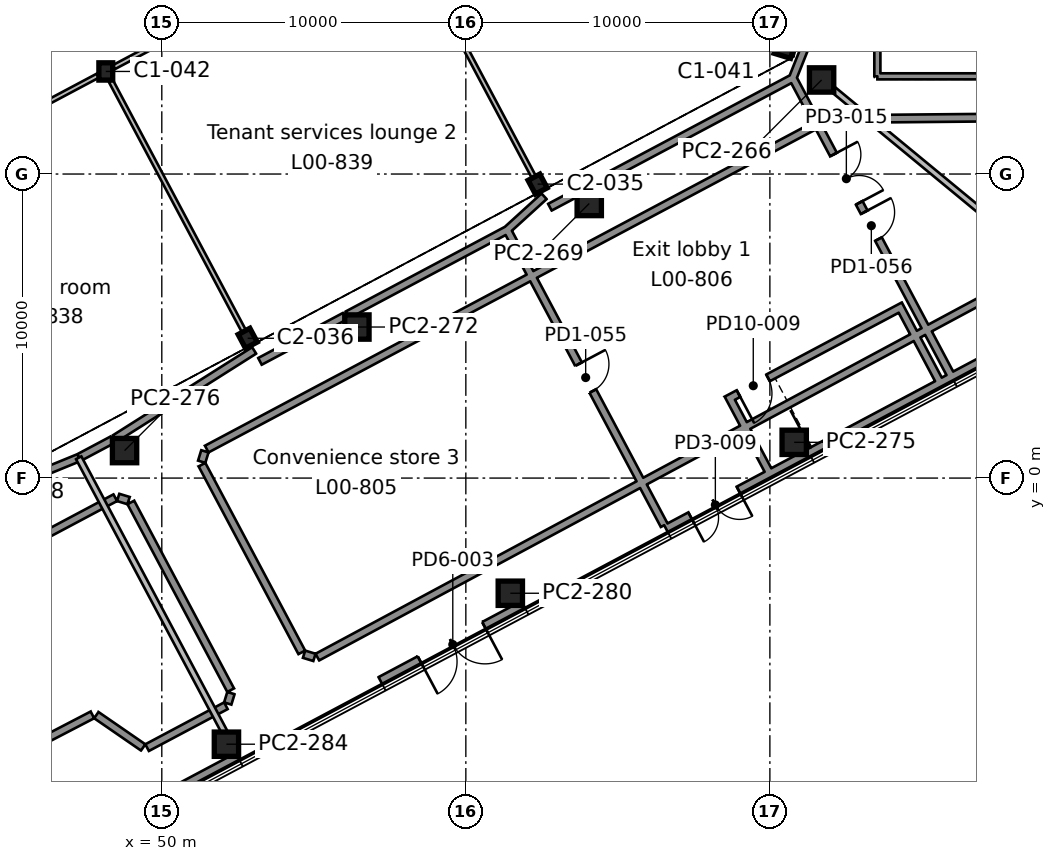
"""IFC4 building model, lengths in metres.
Left out: names, types, materials, properties, quantities, classifications, styles, units other than length and angle.
Written with IfcOpenShell. Run it as: python <this file> out.ifc"""

import sys

from ifc_helpers import new_model, si_unit, direction, frame, frame_2d, origin, origin_2d, place, context, subcontext, project, spatial, rectangle, i_section, extrude, element, fill, save


model = new_model("IFC4")
c1 = context("Model", 3, precision=1e-05, world=origin(), true_north=direction((0.0, 1.0)))
c2 = subcontext(c1, "Body", "Model", "MODEL_VIEW")
j1 = project(units=[si_unit("LENGTHUNIT", "METRE"), si_unit("PLANEANGLEUNIT", "RADIAN")], contexts=[c1])
p1 = place(None, origin())
s1 = spatial("IfcSite", under=j1, at=p1, CompositionType="ELEMENT")
p2 = place(p1, origin())
s2 = spatial("IfcBuilding", under=s1, at=p2, CompositionType="ELEMENT")
p3 = place(p2, origin())
s3 = spatial("IfcBuildingStorey", under=s2, at=p3, CompositionType="ELEMENT", Elevation=0.0)
for number, where, z_axis, x_axis in (
    (1, (52.825, 4.598, 0.0), (0.0, 0.0, 1.0), (0.883, 0.469, 0.0)),
    (2, (62.361, 9.668, 0.0), (0.0, 0.0, 1.0), (0.883, 0.469, 0.0)),
):
    element("IfcColumn", number, at=place(p3, frame(where, z_axis=z_axis, x_axis=x_axis)), inside=s3, PredefinedType="COLUMN", context=c2, shape_type="SweptSolid", body=[
        extrude(i_section(OverallWidth=0.437, OverallDepth=0.513, WebThickness=0.061, FlangeThickness=0.097, FilletRadius=0.015, at=origin_2d()), origin(), (0.0, 0.0, 1.0), 7.0),
    ])
for number, where, z_axis, x_axis in (
    (3, (48.158, 13.374, 0.0), (0.0, 0.0, 1.0), (1.0, 0.0, 0.0)),
    (4, (70.474, 14.106, 0.0), (0.0, 0.0, 1.0), (0.292, 0.956, 0.0)),
):
    element("IfcColumn", number, at=place(p3, frame(where, z_axis=z_axis, x_axis=x_axis)), inside=s3, PredefinedType="COLUMN", context=c2, shape_type="SweptSolid", body=[
        extrude(i_section(OverallWidth=0.455, OverallDepth=0.569, WebThickness=0.078, FlangeThickness=0.125, FilletRadius=0.015, at=origin_2d()), origin(), (0.0, 0.0, 1.0), 7.0),
    ])
for number, where, z_axis, x_axis in (
    (5, (52.126, -8.753, 0.0), (0.0, 0.0, 1.0), (1.0, 0.0, 0.0)),
    (6, (61.463, -3.788, 0.0), (0.0, 0.0, 1.0), (1.0, 0.0, 0.0)),
    (7, (48.775, 0.904, 0.0), (0.0, 0.0, 1.0), (1.0, 0.0, 0.0)),
    (8, (70.8, 1.176, 0.0), (0.0, 0.0, 1.0), (1.0, 0.0, 0.0)),
    (9, (56.417, 4.968, 0.0), (0.0, 0.0, 1.0), (1.0, 0.0, 0.0)),
    (10, (64.059, 9.031, 0.0), (0.0, 0.0, 1.0), (1.0, 0.0, 0.0)),
    (11, (71.701, 13.094, 0.0), (0.0, 0.0, 1.0), (1.0, 0.0, 0.0)),
):
    element("IfcColumn", number, at=place(p3, frame(where, z_axis=z_axis, x_axis=x_axis)), inside=s3, PredefinedType="COLUMN", context=c2, shape_type="SweptSolid", body=[
        extrude(rectangle(XDim=0.8, YDim=0.8, at=origin_2d()), origin(), (0.0, 0.0, 1.0), 6.37),
    ])
p4 = place(p3, frame((29.035, -21.71, 0.0), z_axis=(0.0, 0.0, 1.0), x_axis=(0.882950500829, 0.469466093648, 0.0)))
e12 = element("IfcWall", 12, at=p4, inside=s3, PredefinedType="SOLIDWALL", context=c2, shape_type="SweptSolid", body=[
    extrude(rectangle(XDim=26.603, YDim=0.4, at=frame_2d((13.301, 0.0))), origin(), (0.0, 0.0, 1.0), 6.37),
])
p5 = place(p4, frame((1.46, 0.0, 0.0)))
e13 = element("IfcOpeningElement", 13, at=p5, cuts=e12, PredefinedType="OPENING", context=c2, shape_type="SweptSolid", body=[
    extrude(rectangle(XDim=2.4, YDim=2.4, at=frame_2d((1.2, 1.2))), frame((0.0, 0.21, 0.0), z_axis=(0.0, -1.0, 0.0), x_axis=(1.0, 0.0, 0.0)), (0.0, 0.0, 1.0), 0.42),
])
p6 = place(p3, frame((57.222, -6.723, 0.0), z_axis=(0.0, 0.0, 1.0), x_axis=(0.882960613555, 0.4694470736, 0.0)))
e14 = element("IfcWall", 14, at=p6, inside=s3, PredefinedType="SOLIDWALL", context=c2, shape_type="SweptSolid", body=[
    extrude(rectangle(XDim=5.321, YDim=0.4, at=frame_2d((2.66, 0.0))), origin(), (0.0, 0.0, 1.0), 6.37),
])
p7 = place(p6, frame((1.46, 0.0, 0.0)))
e15 = element("IfcOpeningElement", 15, at=p7, cuts=e14, PredefinedType="OPENING", context=c2, shape_type="SweptSolid", body=[
    extrude(rectangle(XDim=2.4, YDim=2.4, at=frame_2d((1.2, 1.2))), frame((0.0, 0.21, 0.0), z_axis=(0.0, -1.0, 0.0), x_axis=(1.0, 0.0, 0.0)), (0.0, 0.0, 1.0), 0.42),
])
p8 = place(p3, frame((66.617, -1.727, 0.0), z_axis=(0.0, 0.0, 1.0), x_axis=(0.882952470549, 0.469462389071, 0.0)))
e16 = element("IfcWall", 16, at=p8, inside=s3, PredefinedType="SOLIDWALL", context=c2, shape_type="SweptSolid", body=[
    extrude(rectangle(XDim=15.999, YDim=0.4, at=frame_2d((8.0, 0.0))), origin(), (0.0, 0.0, 1.0), 6.37),
])
p9 = place(p8, frame((0.9, 0.0, 0.0)))
e17 = element("IfcOpeningElement", 17, at=p9, cuts=e16, PredefinedType="OPENING", context=c2, shape_type="SweptSolid", body=[
    extrude(rectangle(XDim=1.8, YDim=2.1, at=frame_2d((0.9, 1.05))), frame((0.0, 0.21, 0.0), z_axis=(0.0, -1.0, 0.0), x_axis=(1.0, 0.0, 0.0)), (0.0, 0.0, 1.0), 0.42),
])
p10 = place(p8, frame((12.101, 0.0, 0.0)))
e18 = element("IfcOpeningElement", 18, at=p10, cuts=e16, PredefinedType="OPENING", context=c2, shape_type="SweptSolid", body=[
    extrude(rectangle(XDim=2.4, YDim=2.4, at=frame_2d((1.2, 1.2))), frame((0.0, 0.21, 0.0), z_axis=(0.0, -1.0, 0.0), x_axis=(1.0, 0.0, 0.0)), (0.0, 0.0, 1.0), 0.42),
])
p11 = place(p3, frame((33.134, -8.8, 7.0), z_axis=(0.0, 0.0, 1.0), x_axis=(0.882946405611, 0.469473795667, 0.0)))
e19 = element("IfcWall", 19, at=p11, inside=s3, PredefinedType="STANDARD", context=c2, shape_type="SweptSolid", body=[
    extrude(rectangle(XDim=17.368, YDim=0.25, at=frame_2d((8.684, 0.0))), origin(), (0.0, 0.0, 1.0), 0.65),
])
p12 = place(p3, frame((48.565, -0.636, 7.0), z_axis=(0.0, 0.0, 1.0), x_axis=(0.956161046089, -0.292841346024, 0.0)))
e20 = element("IfcWall", 20, at=p12, inside=s3, PredefinedType="STANDARD", context=c2, shape_type="SweptSolid", body=[
    extrude(rectangle(XDim=0.358, YDim=0.25, at=frame_2d((0.179, 0.0))), origin(), (0.0, 0.0, 1.0), 0.65),
])
p13 = place(p3, frame((48.982, -0.802, 7.0), z_axis=(0.0, 0.0, 1.0), x_axis=(0.469473426487, -0.882946601909, 0.0)))
e21 = element("IfcWall", 21, at=p13, inside=s3, PredefinedType="STANDARD", context=c2, shape_type="SweptSolid", body=[
    extrude(rectangle(XDim=6.993, YDim=0.25, at=frame_2d((3.497, 0.0))), origin(), (0.0, 0.0, 1.0), 0.65),
])
p14 = place(p3, frame((52.274, -7.072, 7.0), z_axis=(0.0, 0.0, 1.0), x_axis=(-0.2920282937, -0.956409679833, 0.0)))
e22 = element("IfcWall", 22, at=p14, inside=s3, PredefinedType="STANDARD", context=c2, shape_type="SweptSolid", body=[
    extrude(rectangle(XDim=0.359, YDim=0.25, at=frame_2d((0.179, 0.0))), origin(), (0.0, 0.0, 1.0), 0.65),
])
p15 = place(p3, frame((52.108, -7.488, 7.0), z_axis=(0.0, 0.0, 1.0), x_axis=(-0.882932555062, -0.469499843675, 0.0)))
e23 = element("IfcWall", 23, at=p15, inside=s3, PredefinedType="STANDARD", context=c2, shape_type="SweptSolid", body=[
    extrude(rectangle(XDim=2.935, YDim=0.25, at=frame_2d((1.467, 0.0))), origin(), (0.0, 0.0, 1.0), 0.65),
])
p16 = place(p3, frame((49.387, -8.859, 7.0), z_axis=(0.0, 0.0, 1.0), x_axis=(-0.823317911424, 0.567580493612, 0.0)))
e24 = element("IfcWall", 24, at=p16, inside=s3, PredefinedType="STANDARD", context=c2, shape_type="SweptSolid", body=[
    extrude(rectangle(XDim=1.871, YDim=0.25, at=frame_2d((0.936, 0.0))), origin(), (0.0, 0.0, 1.0), 0.65),
])
p17 = place(p3, frame((47.718, -7.789, 7.0), z_axis=(0.0, 0.0, 1.0), x_axis=(-0.887347881886, -0.461100570931, 0.0)))
e25 = element("IfcWall", 25, at=p17, inside=s3, PredefinedType="STANDARD", context=c2, shape_type="SweptSolid", body=[
    extrude(rectangle(XDim=9.695, YDim=0.25, at=frame_2d((4.847, 0.0))), origin(), (0.0, 0.0, 1.0), 0.65),
])
p18 = place(p3, frame((71.913, 11.806, 7.0), z_axis=(0.0, 0.0, 1.0), x_axis=(0.999958126226, 0.0091512728, 0.0)))
e26 = element("IfcWall", 26, at=p18, inside=s3, PredefinedType="STANDARD", context=c2, shape_type="SweptSolid", body=[
    extrude(rectangle(XDim=6.723, YDim=0.25, at=frame_2d((3.361, 0.0))), origin(), (0.0, 0.0, 1.0), 0.65),
])
p19 = place(p3, frame((79.199, 7.048, 7.0), z_axis=(0.0, 0.0, 1.0), x_axis=(-0.880943825578, -0.473220853488, 0.0)))
e27 = element("IfcWall", 27, at=p19, inside=s3, PredefinedType="STANDARD", context=c2, shape_type="SweptSolid", body=[
    extrude(rectangle(XDim=27.337, YDim=0.25, at=frame_2d((13.668, 0.0))), origin(), (0.0, 0.0, 1.0), 0.65),
])
p20 = place(p3, frame((55.021, -5.898, 7.0), z_axis=(0.0, 0.0, 1.0), x_axis=(-0.956425680527, 0.291975885354, 0.0)))
e28 = element("IfcWall", 28, at=p20, inside=s3, PredefinedType="STANDARD", context=c2, shape_type="SweptSolid", body=[
    extrude(rectangle(XDim=0.358, YDim=0.25, at=frame_2d((0.179, 0.0))), origin(), (0.0, 0.0, 1.0), 0.65),
])
p21 = place(p3, frame((54.604, -5.732, 7.0), z_axis=(0.0, 0.0, 1.0), x_axis=(-0.46950064371, 0.882932129643, 0.0)))
e29 = element("IfcWall", 29, at=p21, inside=s3, PredefinedType="STANDARD", context=c2, shape_type="SweptSolid", body=[
    extrude(rectangle(XDim=6.993, YDim=0.25, at=frame_2d((3.497, 0.0))), origin(), (0.0, 0.0, 1.0), 0.65),
])
p22 = place(p3, frame((51.312, 0.537, 7.0), z_axis=(0.0, 0.0, 1.0), x_axis=(0.2920282937, 0.956409679833, 0.0)))
e30 = element("IfcWall", 30, at=p22, inside=s3, PredefinedType="STANDARD", context=c2, shape_type="SweptSolid", body=[
    extrude(rectangle(XDim=0.359, YDim=0.25, at=frame_2d((0.179, 0.0))), origin(), (0.0, 0.0, 1.0), 0.65),
])
p23 = place(p3, frame((51.478, 0.954, 7.0), z_axis=(0.0, 0.0, 1.0), x_axis=(0.88290924417, 0.469543679075, 0.0)))
e31 = element("IfcWall", 31, at=p23, inside=s3, PredefinedType="STANDARD", context=c2, shape_type="SweptSolid", body=[
    extrude(rectangle(XDim=23.081, YDim=0.25, at=frame_2d((11.541, 0.0))), origin(), (0.0, 0.0, 1.0), 0.65),
])
for number, where, z_axis, x_axis in (
    (32, (77.335, 13.213, 6.92), (0.0, 0.0, 1.0), (-1.0, 0.0, 0.0)),
    (33, (73.535, 13.213, 6.92), (0.0, 0.0, 1.0), (0.0, 1.0, 0.0)),
):
    element("IfcWall", number, at=place(p3, frame(where, z_axis=z_axis, x_axis=x_axis)), inside=s3, PredefinedType="SOLIDWALL", context=c2, shape_type="SweptSolid", body=[
        extrude(rectangle(XDim=3.8, YDim=0.2, at=frame_2d((1.9, 0.0))), origin(), (0.0, 0.0, 1.0), 0.18),
    ])
p24 = place(p3, frame((52.063, -8.353, 0.0), z_axis=(0.0, 0.0, 1.0), x_axis=(-0.469467926311, 0.882949526397, 0.0)))
e34 = element("IfcWall", 34, at=p24, inside=s3, PredefinedType="PARTITIONING", context=c2, shape_type="SweptSolid", body=[
    extrude(rectangle(XDim=10.217, YDim=0.2, at=frame_2d((5.109, 0.0))), origin(), (0.0, 0.0, 1.0), 6.37),
])
p25 = place(p3, frame((47.27, 0.67, 0.0), z_axis=(0.0, 0.0, 1.0), x_axis=(-0.925490593681, -0.378770591531, 0.0)))
e35 = element("IfcWall", 35, at=p25, inside=s3, PredefinedType="SOLIDWALL", context=c2, shape_type="SweptSolid", body=[
    extrude(rectangle(XDim=4.072, YDim=0.25, at=frame_2d((2.036, 0.0))), origin(), (0.0, 0.0, 1.0), 6.37),
])
p26 = place(p3, frame((66.523, -1.551, 0.0), z_axis=(0.0, 0.0, 1.0), x_axis=(-0.469471626463, 0.882947559001, 0.0)))
e36 = element("IfcWall", 36, at=p26, inside=s3, PredefinedType="SOLIDWALL", context=c2, shape_type="SweptSolid", body=[
    extrude(rectangle(XDim=11.0, YDim=0.25, at=frame_2d((5.5, 0.0))), origin(), (0.0, 0.0, 1.0), 6.37),
])
p27 = place(p26, frame((5.0, 0.0, 0.0)))
e37 = element("IfcOpeningElement", 37, at=p27, cuts=e36, PredefinedType="OPENING", context=c2, shape_type="SweptSolid", body=[
    extrude(rectangle(XDim=1.0, YDim=2.1, at=frame_2d((0.5, 1.05))), frame((0.0, 0.135, 0.0), z_axis=(0.0, -1.0, 0.0), x_axis=(1.0, 0.0, 0.0)), (0.0, 0.0, 1.0), 0.27),
])
p28 = place(p3, frame((53.037, 4.198, 0.0), z_axis=(0.0, 0.0, 1.0), x_axis=(-0.845143693755, -0.534539181825, 0.0)))
e38 = element("IfcWall", 38, at=p28, inside=s3, PredefinedType="SOLIDWALL", context=c2, shape_type="SweptSolid", body=[
    extrude(rectangle(XDim=5.414, YDim=0.25, at=frame_2d((2.707, 0.0))), origin(), (0.0, 0.0, 1.0), 6.37),
])
p29 = place(p3, frame((48.375, 1.258, 0.0), z_axis=(0.0, 0.0, 1.0), x_axis=(-0.883006084416, -0.469361539631, 0.0)))
e39 = element("IfcWall", 39, at=p29, inside=s3, PredefinedType="SOLIDWALL", context=c2, shape_type="SweptSolid", body=[
    extrude(rectangle(XDim=1.24, YDim=0.25, at=frame_2d((0.62, 0.0))), origin(), (0.0, 0.0, 1.0), 6.37),
])
p30 = place(p3, frame((61.363, 8.164, 0.0), z_axis=(0.0, 0.0, 1.0), x_axis=(-0.882945796858, -0.469474940556, 0.0)))
e40 = element("IfcWall", 40, at=p30, inside=s3, PredefinedType="SOLIDWALL", context=c2, shape_type="SweptSolid", body=[
    extrude(rectangle(XDim=5.955, YDim=0.25, at=frame_2d((2.978, 0.0))), origin(), (0.0, 0.0, 1.0), 6.37),
])
p31 = place(p3, frame((56.017, 5.321, 0.0), z_axis=(0.0, 0.0, 1.0), x_axis=(-0.882921481106, -0.469520668555, 0.0)))
e41 = element("IfcWall", 41, at=p31, inside=s3, PredefinedType="SOLIDWALL", context=c2, shape_type="SweptSolid", body=[
    extrude(rectangle(XDim=3.158, YDim=0.25, at=frame_2d((1.579, 0.0))), origin(), (0.0, 0.0, 1.0), 6.37),
])
p32 = place(p3, frame((75.919, 3.445, 0.0), z_axis=(0.0, 0.0, 1.0), x_axis=(-0.469463523634, 0.882951867305, 0.0)))
e42 = element("IfcWall", 42, at=p32, inside=s3, PredefinedType="SOLIDWALL", context=c2, shape_type="SweptSolid", body=[
    extrude(rectangle(XDim=11.0, YDim=0.25, at=frame_2d((5.5, 0.0))), origin(), (0.0, 0.0, 1.0), 6.37),
])
p33 = place(p32, frame((5.0, 0.0, 0.0)))
e43 = element("IfcOpeningElement", 43, at=p33, cuts=e42, PredefinedType="OPENING", context=c2, shape_type="SweptSolid", body=[
    extrude(rectangle(XDim=1.0, YDim=2.1, at=frame_2d((0.5, 1.05))), frame((0.0, 0.135, 0.0), z_axis=(0.0, -1.0, 0.0), x_axis=(1.0, 0.0, 0.0)), (0.0, 0.0, 1.0), 0.27),
])
p34 = place(p32, frame((6.35, 0.0, 0.0)))
e44 = element("IfcOpeningElement", 44, at=p34, cuts=e42, PredefinedType="OPENING", context=c2, shape_type="SweptSolid", body=[
    extrude(rectangle(XDim=1.8, YDim=2.1, at=frame_2d((0.9, 1.05))), frame((0.0, 0.135, 0.0), z_axis=(0.0, -1.0, 0.0), x_axis=(1.0, 0.0, 0.0)), (0.0, 0.0, 1.0), 0.27),
])
p35 = place(p3, frame((62.573, 9.268, 0.0), z_axis=(0.0, 0.0, 1.0), x_axis=(-0.739544046234, -0.673108166404, 0.0)))
e45 = element("IfcWall", 45, at=p35, inside=s3, PredefinedType="SOLIDWALL", context=c2, shape_type="SweptSolid", body=[
    extrude(rectangle(XDim=1.646, YDim=0.25, at=frame_2d((0.823, 0.0))), origin(), (0.0, 0.0, 1.0), 6.37),
])
p36 = place(p3, frame((70.758, 13.159, 0.0), z_axis=(0.0, 0.0, 1.0), x_axis=(-0.882950480299, -0.46946613226, 0.0)))
e46 = element("IfcWall", 46, at=p36, inside=s3, PredefinedType="SOLIDWALL", context=c2, shape_type="SweptSolid", body=[
    extrude(rectangle(XDim=7.941, YDim=0.25, at=frame_2d((3.971, 0.0))), origin(), (0.0, 0.0, 1.0), 6.37),
])
p37 = place(p3, frame((63.659, 9.385, 0.0), z_axis=(0.0, 0.0, 1.0), x_axis=(-0.882866012348, -0.469624961263, 0.0)))
e47 = element("IfcWall", 47, at=p37, inside=s3, PredefinedType="SOLIDWALL", context=c2, shape_type="SweptSolid", body=[
    extrude(rectangle(XDim=1.013, YDim=0.25, at=frame_2d((0.507, 0.0))), origin(), (0.0, 0.0, 1.0), 6.37),
])
p38 = place(p3, frame((79.737, 6.47, 0.0), z_axis=(0.0, 0.0, 1.0), x_axis=(-0.771621787966, 0.63608161138, 0.0)))
e48 = element("IfcWall", 48, at=p38, inside=s3, PredefinedType="PARTITIONING", context=c2, shape_type="SweptSolid", body=[
    extrude(rectangle(XDim=9.896, YDim=0.2, at=frame_2d((4.948, 0.0))), origin(), (0.0, 0.0, 1.0), 6.37),
])
p39 = place(p3, frame((72.669, 17.971, 0.0), z_axis=(0.0, 0.0, 1.0), x_axis=(-0.370009777786, -0.929027859831, 0.0)))
e49 = element("IfcWall", 49, at=p39, inside=s3, PredefinedType="SOLIDWALL", context=c2, shape_type="SweptSolid", body=[
    extrude(rectangle(XDim=5.184, YDim=0.25, at=frame_2d((2.592, 0.0))), origin(), (0.0, 0.0, 1.0), 6.37),
])
p40 = place(p39, frame((2.092, 0.0, 0.0)))
e50 = element("IfcOpeningElement", 50, at=p40, cuts=e49, PredefinedType="OPENING", context=c2, shape_type="SweptSolid", body=[
    extrude(rectangle(XDim=1.0, YDim=2.1, at=frame_2d((0.5, 1.05))), frame((0.0, 0.135, 0.0), z_axis=(0.0, -1.0, 0.0), x_axis=(1.0, 0.0, 0.0)), (0.0, 0.0, 1.0), 0.27),
])
p41 = place(p3, frame((38.622, 8.304, 0.0), z_axis=(0.0, 0.0, 1.0), x_axis=(0.882956451437, 0.469454901845, 0.0)))
e51 = element("IfcWall", 51, at=p41, inside=s3, PredefinedType="PARTITIONING", context=c2, shape_type="SweptSolid", body=[
    extrude(rectangle(XDim=10.502, YDim=0.15, at=frame_2d((5.251, 0.0))), origin(), (0.0, 0.0, 1.0), 6.55),
])
p42 = place(p41, frame((4.673, 0.0, 0.0)))
e52 = element("IfcOpeningElement", 52, at=p42, cuts=e51, PredefinedType="OPENING", context=c2, shape_type="SweptSolid", body=[
    extrude(rectangle(XDim=1.0, YDim=2.1, at=frame_2d((0.5, 1.05))), frame((0.0, 0.085, 0.0), z_axis=(0.0, -1.0, 0.0), x_axis=(1.0, 0.0, 0.0)), (0.0, 0.0, 1.0), 0.17),
])
p43 = place(p3, frame((48.421, 13.514, 0.0), z_axis=(0.0, 0.0, 1.0), x_axis=(0.882940965658, 0.469484026526, 0.0)))
e53 = element("IfcWall", 53, at=p43, inside=s3, PredefinedType="PARTITIONING", context=c2, shape_type="SweptSolid", body=[
    extrude(rectangle(XDim=10.205, YDim=0.15, at=frame_2d((5.103, 0.0))), origin(), (0.0, 0.0, 1.0), 6.55),
])
p44 = place(p43, frame((4.603, 0.0, 0.0)))
e54 = element("IfcOpeningElement", 54, at=p44, cuts=e53, PredefinedType="OPENING", context=c2, shape_type="SweptSolid", body=[
    extrude(rectangle(XDim=1.0, YDim=2.1, at=frame_2d((0.5, 1.05))), frame((0.0, 0.085, 0.0), z_axis=(0.0, -1.0, 0.0), x_axis=(1.0, 0.0, 0.0)), (0.0, 0.0, 1.0), 0.17),
])
p45 = place(p3, frame((52.704, 4.824, 0.0), z_axis=(0.0, 0.0, 1.0), x_axis=(-0.469494001944, 0.882935661381, 0.0)))
e55 = element("IfcWall", 55, at=p45, inside=s3, PredefinedType="PARTITIONING", context=c2, shape_type="SweptSolid", body=[
    extrude(rectangle(XDim=9.325, YDim=0.15, at=frame_2d((4.663, 0.0))), origin(), (0.0, 0.0, 1.0), 6.55),
])
p46 = place(p3, frame((62.24, 9.894, 0.0), z_axis=(0.0, 0.0, 1.0), x_axis=(-0.469471003187, 0.882947890403, 0.0)))
e56 = element("IfcWall", 56, at=p46, inside=s3, PredefinedType="PARTITIONING", context=c2, shape_type="SweptSolid", body=[
    extrude(rectangle(XDim=9.326, YDim=0.15, at=frame_2d((4.663, 0.0))), origin(), (0.0, 0.0, 1.0), 6.55),
])
p47 = place(p3, frame((69.937, 0.264, 0.0), z_axis=(0.0, 0.0, 1.0), x_axis=(-0.469533439143, 0.882914689835, 0.0)))
e57 = element("IfcWall", 57, at=p47, inside=s3, PredefinedType="SOLIDWALL", context=c2, shape_type="SweptSolid", body=[
    extrude(rectangle(XDim=2.8, YDim=0.25, at=frame_2d((1.4, 0.0))), origin(), (0.0, 0.0, 1.0), 6.37),
])
p48 = place(p3, frame((75.544, 3.245, 0.0), z_axis=(0.0, 0.0, 1.0), x_axis=(-0.469497295046, 0.882933910293, 0.0)))
e58 = element("IfcWall", 58, at=p48, inside=s3, PredefinedType="SOLIDWALL", context=c2, shape_type="SweptSolid", body=[
    extrude(rectangle(XDim=2.8, YDim=0.25, at=frame_2d((1.4, 0.0))), origin(), (0.0, 0.0, 1.0), 6.37),
])
p49 = place(p3, frame((68.571, 2.567, 0.0), z_axis=(0.0, 0.0, 1.0), x_axis=(0.882937969766, 0.469489660743, 0.0)))
e59 = element("IfcWall", 59, at=p49, inside=s3, PredefinedType="SOLIDWALL", context=c2, shape_type="SweptSolid", body=[
    extrude(rectangle(XDim=6.6, YDim=0.25, at=frame_2d((3.3, 0.0))), origin(), (0.0, 0.0, 1.0), 6.37),
])
p50 = place(p49, frame((0.45, 0.0, 0.0)))
e60 = element("IfcOpeningElement", 60, at=p50, cuts=e59, PredefinedType="OPENING", context=c2, shape_type="SweptSolid", body=[
    extrude(rectangle(XDim=1.1, YDim=2.1, at=frame_2d((0.55, 1.05))), frame((0.0, 0.135, 0.0), z_axis=(0.0, -1.0, 0.0), x_axis=(1.0, 0.0, 0.0)), (0.0, 0.0, 1.0), 0.27),
])
p51 = place(p7, frame((2.4, 0.0, 0.0), z_axis=(0.0, 0.0, 1.0), x_axis=(-1.0, 0.0, 0.0)))
e61 = element("IfcDoor", 61, at=p51, inside=s3, OperationType="DOUBLE_DOOR_SINGLE_SWING", PredefinedType="DOOR", context=c2, shape_type="SweptSolid", body=[
    extrude(rectangle(XDim=2.4, YDim=2.4, at=frame_2d((1.2, 1.2))), frame((0.0, 0.025, 0.0), z_axis=(0.0, -1.0, 0.0), x_axis=(1.0, 0.0, 0.0)), (0.0, 0.0, 1.0), 0.05),
])
fill(e15, e61)
p52 = place(p9, frame((1.8, 0.0, 0.0), z_axis=(0.0, 0.0, 1.0), x_axis=(-1.0, 0.0, 0.0)))
e62 = element("IfcDoor", 62, at=p52, inside=s3, OperationType="DOUBLE_DOOR_SINGLE_SWING", PredefinedType="DOOR", context=c2, shape_type="SweptSolid", body=[
    extrude(rectangle(XDim=1.8, YDim=2.1, at=frame_2d((0.9, 1.05))), frame((0.0, 0.025, 0.0), z_axis=(0.0, -1.0, 0.0), x_axis=(1.0, 0.0, 0.0)), (0.0, 0.0, 1.0), 0.05),
])
fill(e17, e62)
p53 = place(p3, frame((0.0, 0.0, 6.37)))
p54 = place(p53, frame((75.435, 15.113, 0.0)))
p55 = place(p54, frame((0.0, 0.0, 0.5)))
e63 = element("IfcWindow", 63, at=p55, inside=s3, PartitioningType="SINGLE_PANEL", PredefinedType="SKYLIGHT", context=c2, shape_type="SweptSolid", body=[
    extrude(rectangle(XDim=3.6, YDim=3.6, at=origin_2d()), origin(), (0.0, 0.0, 1.0), 0.05),
])
p56 = place(p50, frame((1.1, 0.0, 0.0), z_axis=(0.0, 0.0, 1.0), x_axis=(-1.0, 0.0, 0.0)))
e64 = element("IfcDoor", 64, at=p56, inside=s3, OperationType="SINGLE_SWING_RIGHT", PredefinedType="DOOR", context=c2, shape_type="SweptSolid", body=[
    extrude(rectangle(XDim=1.1, YDim=2.1, at=frame_2d((0.55, 1.05))), frame((0.0, 0.025, 0.0), z_axis=(0.0, -1.0, 0.0), x_axis=(1.0, 0.0, 0.0)), (0.0, 0.0, 1.0), 0.05),
])
fill(e60, e64)
p57 = place(p33, frame((1.0, 0.0, 0.0), z_axis=(0.0, 0.0, 1.0), x_axis=(-1.0, 0.0, 0.0)))
e65 = element("IfcDoor", 65, at=p57, inside=s3, OperationType="SINGLE_SWING_LEFT", PredefinedType="DOOR", context=c2, shape_type="SweptSolid", body=[
    extrude(rectangle(XDim=1.0, YDim=2.1, at=frame_2d((0.5, 1.05))), frame((0.0, 0.025, 0.0), z_axis=(0.0, -1.0, 0.0), x_axis=(1.0, 0.0, 0.0)), (0.0, 0.0, 1.0), 0.05),
])
fill(e43, e65)
p58 = place(p27, frame((1.0, 0.0, 0.0), z_axis=(0.0, 0.0, 1.0), x_axis=(-1.0, 0.0, 0.0)))
e66 = element("IfcDoor", 66, at=p58, inside=s3, OperationType="SINGLE_SWING_LEFT", PredefinedType="DOOR", context=c2, shape_type="SweptSolid", body=[
    extrude(rectangle(XDim=1.0, YDim=2.1, at=frame_2d((0.5, 1.05))), frame((0.0, 0.025, 0.0), z_axis=(0.0, -1.0, 0.0), x_axis=(1.0, 0.0, 0.0)), (0.0, 0.0, 1.0), 0.05),
])
fill(e37, e66)
p59 = place(p34, frame((1.8, 0.0, 0.0), z_axis=(0.0, 0.0, 1.0), x_axis=(-1.0, 0.0, 0.0)))
e67 = element("IfcDoor", 67, at=p59, inside=s3, OperationType="DOUBLE_DOOR_SINGLE_SWING", PredefinedType="DOOR", context=c2, shape_type="SweptSolid", body=[
    extrude(rectangle(XDim=1.8, YDim=2.1, at=frame_2d((0.9, 1.05))), frame((0.0, 0.025, 0.0), z_axis=(0.0, -1.0, 0.0), x_axis=(1.0, 0.0, 0.0)), (0.0, 0.0, 1.0), 0.05),
])
fill(e44, e67)
save(model, sys.argv[1])
